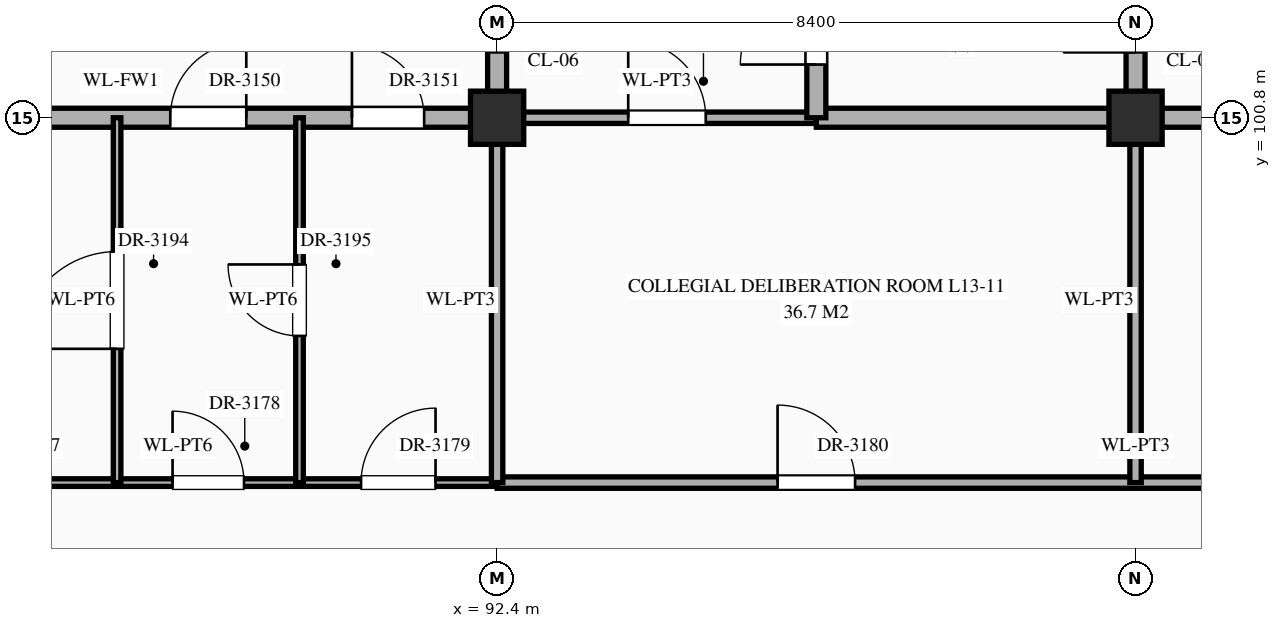
"""IFC4 building model, lengths in metres.
Left out: names, types, materials, properties, quantities, classifications, styles, units other than length and angle.
Written with IfcOpenShell. Run it as: python <this file> out.ifc"""

import sys

from ifc_helpers import new_model, si_unit, direction, frame, frame_2d, origin, origin_2d, place, context, subcontext, project, spatial, rectangle, extrude, element, fill, save


model = new_model("IFC4")
c1 = context("Model", 3, precision=1e-05, world=origin(), true_north=direction((0.0, 1.0)))
c2 = subcontext(c1, "Body", "Model", "MODEL_VIEW")
j1 = project(units=[si_unit("LENGTHUNIT", "METRE"), si_unit("PLANEANGLEUNIT", "RADIAN")], contexts=[c1])
p1 = place(None, origin())
s1 = spatial("IfcSite", under=j1, at=p1, CompositionType="ELEMENT")
p2 = place(p1, origin())
s2 = spatial("IfcBuilding", under=s1, at=p2, CompositionType="ELEMENT")
p3 = place(p2, frame((0.0, 0.0, 56.1)))
s3 = spatial("IfcBuildingStorey", under=s2, at=p3, CompositionType="ELEMENT", Elevation=56.1)
for number, where, z_axis, x_axis in (
    (1, (92.4, 100.8, 0.0), (0.0, 0.0, 1.0), (1.0, 0.0, 0.0)),
    (2, (100.8, 100.8, 0.0), (0.0, 0.0, 1.0), (1.0, 0.0, 0.0)),
):
    element("IfcColumn", number, at=place(p3, frame(where, z_axis=z_axis, x_axis=x_axis)), inside=s3, PredefinedType="COLUMN", context=c2, shape_type="SweptSolid", body=[
        extrude(rectangle(XDim=0.7, YDim=0.7, at=origin_2d()), origin(), (0.0, 0.0, 1.0), 4.2),
    ])
p4 = place(p3, frame((84.0, 96.0, 0.0), z_axis=(0.0, 0.0, 1.0), x_axis=(1.0, 0.0, 0.0)))
e3 = element("IfcWall", 3, at=p4, inside=s3, PredefinedType="STANDARD", context=c2, shape_type="SweptSolid", body=[
    extrude(rectangle(XDim=8.4, YDim=0.1, at=frame_2d((4.2, 0.0))), origin(), (0.0, 0.0, 1.0), 3.96),
])
p5 = place(p4, frame((1.06, 0.0, 0.0)))
e4 = element("IfcOpeningElement", 4, at=p5, cuts=e3, PredefinedType="OPENING", context=c2, shape_type="SweptSolid", body=[
    extrude(rectangle(XDim=1.28, YDim=2.35, at=frame_2d((0.64, 1.175))), frame((0.0, 0.062, 0.0), z_axis=(0.0, -1.0, 0.0), x_axis=(1.0, 0.0, 0.0)), (0.0, 0.0, 1.0), 0.124),
])
p6 = place(p4, frame((4.13, 0.0, 0.0)))
e5 = element("IfcOpeningElement", 5, at=p6, cuts=e3, PredefinedType="OPENING", context=c2, shape_type="SweptSolid", body=[
    extrude(rectangle(XDim=0.94, YDim=2.3, at=frame_2d((0.47, 1.15))), frame((0.0, 0.062, 0.0), z_axis=(0.0, -1.0, 0.0), x_axis=(1.0, 0.0, 0.0)), (0.0, 0.0, 1.0), 0.124),
])
p7 = place(p4, frame((6.61, 0.0, 0.0)))
e6 = element("IfcOpeningElement", 6, at=p7, cuts=e3, PredefinedType="OPENING", context=c2, shape_type="SweptSolid", body=[
    extrude(rectangle(XDim=0.98, YDim=2.35, at=frame_2d((0.49, 1.175))), frame((0.0, 0.062, 0.0), z_axis=(0.0, -1.0, 0.0), x_axis=(1.0, 0.0, 0.0)), (0.0, 0.0, 1.0), 0.124),
])
p8 = place(p3, frame((92.4, 96.0, 0.0), z_axis=(0.0, 0.0, 1.0), x_axis=(1.0, 0.0, 0.0)))
e7 = element("IfcWall", 7, at=p8, inside=s3, PredefinedType="STANDARD", context=c2, shape_type="SweptSolid", body=[
    extrude(rectangle(XDim=16.8, YDim=0.15, at=frame_2d((8.4, 0.0))), origin(), (0.0, 0.0, 1.0), 3.96),
])
p9 = place(p8, frame((3.69, 0.0, 0.0)))
e8 = element("IfcOpeningElement", 8, at=p9, cuts=e7, PredefinedType="OPENING", context=c2, shape_type="SweptSolid", body=[
    extrude(rectangle(XDim=1.02, YDim=2.4, at=frame_2d((0.51, 1.2))), frame((0.0, 0.087, 0.0), z_axis=(0.0, -1.0, 0.0), x_axis=(1.0, 0.0, 0.0)), (0.0, 0.0, 1.0), 0.174),
])
p10 = place(p8, frame((12.07, 0.0, 0.0)))
e9 = element("IfcOpeningElement", 9, at=p10, cuts=e7, PredefinedType="OPENING", context=c2, shape_type="SweptSolid", body=[
    extrude(rectangle(XDim=1.06, YDim=2.4, at=frame_2d((0.53, 1.2))), frame((0.0, 0.087, 0.0), z_axis=(0.0, -1.0, 0.0), x_axis=(1.0, 0.0, 0.0)), (0.0, 0.0, 1.0), 0.174),
])
p11 = place(p3, frame((75.6, 100.8, 0.0), z_axis=(0.0, 0.0, 1.0), x_axis=(1.0, 0.0, 0.0)))
e10 = element("IfcWall", 10, at=p11, inside=s3, PredefinedType="STANDARD", context=c2, shape_type="SweptSolid", body=[
    extrude(rectangle(XDim=16.8, YDim=0.25, at=frame_2d((8.4, 0.0))), origin(), (0.0, 0.0, 1.0), 3.11),
])
p12 = place(p11, frame((3.725, 0.0, 0.0)))
e11 = element("IfcOpeningElement", 11, at=p12, cuts=e10, PredefinedType="OPENING", context=c2, shape_type="SweptSolid", body=[
    extrude(rectangle(XDim=0.95, YDim=2.15, at=frame_2d((0.475, 1.075))), frame((0.0, 0.137, 0.0), z_axis=(0.0, -1.0, 0.0), x_axis=(1.0, 0.0, 0.0)), (0.0, 0.0, 1.0), 0.274),
])
p13 = place(p11, frame((9.685, 0.0, 0.0)))
e12 = element("IfcOpeningElement", 12, at=p13, cuts=e10, PredefinedType="OPENING", context=c2, shape_type="SweptSolid", body=[
    extrude(rectangle(XDim=1.1, YDim=2.2, at=frame_2d((0.55, 1.1))), frame((0.0, 0.137, 0.0), z_axis=(0.0, -1.0, 0.0), x_axis=(1.0, 0.0, 0.0)), (0.0, 0.0, 1.0), 0.274),
])
p14 = place(p11, frame((12.5, 0.0, 0.0)))
e13 = element("IfcOpeningElement", 13, at=p14, cuts=e10, PredefinedType="OPENING", context=c2, shape_type="SweptSolid", body=[
    extrude(rectangle(XDim=1.0, YDim=2.2, at=frame_2d((0.5, 1.1))), frame((0.0, 0.137, 0.0), z_axis=(0.0, -1.0, 0.0), x_axis=(1.0, 0.0, 0.0)), (0.0, 0.0, 1.0), 0.274),
])
p15 = place(p11, frame((14.89, 0.0, 0.0)))
e14 = element("IfcOpeningElement", 14, at=p15, cuts=e10, PredefinedType="OPENING", context=c2, shape_type="SweptSolid", body=[
    extrude(rectangle(XDim=0.95, YDim=2.15, at=frame_2d((0.475, 1.075))), frame((0.0, 0.137, 0.0), z_axis=(0.0, -1.0, 0.0), x_axis=(1.0, 0.0, 0.0)), (0.0, 0.0, 1.0), 0.274),
])
p16 = place(p3, frame((92.4, 100.8, 0.0), z_axis=(0.0, 0.0, 1.0), x_axis=(1.0, 0.0, 0.0)))
e15 = element("IfcWall", 15, at=p16, inside=s3, PredefinedType="STANDARD", context=c2, shape_type="SweptSolid", body=[
    extrude(rectangle(XDim=4.2, YDim=0.15, at=frame_2d((2.1, 0.0))), origin(), (0.0, 0.0, 1.0), 3.11),
])
p17 = place(p16, frame((1.725, 0.0, 0.0)))
e16 = element("IfcOpeningElement", 16, at=p17, cuts=e15, PredefinedType="OPENING", context=c2, shape_type="SweptSolid", body=[
    extrude(rectangle(XDim=1.02, YDim=2.4, at=frame_2d((0.51, 1.2))), frame((0.0, 0.087, 0.0), z_axis=(0.0, -1.0, 0.0), x_axis=(1.0, 0.0, 0.0)), (0.0, 0.0, 1.0), 0.174),
])
p18 = place(p3, frame((96.6, 100.8, 0.0), z_axis=(0.0, 0.0, 1.0), x_axis=(1.0, 0.0, 0.0)))
e17 = element("IfcWall", 17, at=p18, inside=s3, PredefinedType="STANDARD", context=c2, shape_type="SweptSolid", body=[
    extrude(rectangle(XDim=12.6, YDim=0.25, at=frame_2d((6.3, 0.0))), origin(), (0.0, 0.0, 1.0), 3.11),
])
p19 = place(p18, frame((7.9, 0.0, 0.0)))
e18 = element("IfcOpeningElement", 18, at=p19, cuts=e17, PredefinedType="OPENING", context=c2, shape_type="SweptSolid", body=[
    extrude(rectangle(XDim=1.0, YDim=2.2, at=frame_2d((0.5, 1.1))), frame((0.0, 0.137, 0.0), z_axis=(0.0, -1.0, 0.0), x_axis=(1.0, 0.0, 0.0)), (0.0, 0.0, 1.0), 0.274),
])
p20 = place(p3, frame((87.4, 96.0, 0.0), z_axis=(0.0, 0.0, 1.0), x_axis=(0.0, 1.0, 0.0)))
e19 = element("IfcWall", 19, at=p20, inside=s3, PredefinedType="STANDARD", context=c2, shape_type="SweptSolid", body=[
    extrude(rectangle(XDim=4.8, YDim=0.1, at=frame_2d((2.4, 0.0))), origin(), (0.0, 0.0, 1.0), 3.96),
])
p21 = place(p20, frame((1.76, 0.0, 0.0)))
e20 = element("IfcOpeningElement", 20, at=p21, cuts=e19, PredefinedType="OPENING", context=c2, shape_type="SweptSolid", body=[
    extrude(rectangle(XDim=1.28, YDim=2.35, at=frame_2d((0.64, 1.175))), frame((0.0, 0.062, 0.0), z_axis=(0.0, -1.0, 0.0), x_axis=(1.0, 0.0, 0.0)), (0.0, 0.0, 1.0), 0.124),
])
p22 = place(p3, frame((89.8, 96.0, 0.0), z_axis=(0.0, 0.0, 1.0), x_axis=(0.0, 1.0, 0.0)))
e21 = element("IfcWall", 21, at=p22, inside=s3, PredefinedType="STANDARD", context=c2, shape_type="SweptSolid", body=[
    extrude(rectangle(XDim=4.8, YDim=0.1, at=frame_2d((2.4, 0.0))), origin(), (0.0, 0.0, 1.0), 3.96),
])
p23 = place(p22, frame((1.93, 0.0, 0.0)))
e22 = element("IfcOpeningElement", 22, at=p23, cuts=e21, PredefinedType="OPENING", context=c2, shape_type="SweptSolid", body=[
    extrude(rectangle(XDim=0.94, YDim=2.3, at=frame_2d((0.47, 1.15))), frame((0.0, 0.062, 0.0), z_axis=(0.0, -1.0, 0.0), x_axis=(1.0, 0.0, 0.0)), (0.0, 0.0, 1.0), 0.124),
])
p24 = place(p3, frame((92.4, 96.0, 0.0), z_axis=(0.0, 0.0, 1.0), x_axis=(0.0, 1.0, 0.0)))
e23 = element("IfcWall", 23, at=p24, inside=s3, PredefinedType="STANDARD", context=c2, shape_type="SweptSolid", body=[
    extrude(rectangle(XDim=4.8, YDim=0.15, at=frame_2d((2.4, 0.0))), origin(), (0.0, 0.0, 1.0), 3.21),
])
p25 = place(p3, frame((92.4, 100.8, 0.0), z_axis=(0.0, 0.0, 1.0), x_axis=(0.0, 1.0, 0.0)))
e24 = element("IfcWall", 24, at=p25, inside=s3, PredefinedType="STANDARD", context=c2, shape_type="SweptSolid", body=[
    extrude(rectangle(XDim=3.6, YDim=0.25, at=frame_2d((1.8, 0.0))), origin(), (0.0, 0.0, 1.0), 3.21),
])
p26 = place(p25, frame((0.86, 0.0, 0.0)))
e25 = element("IfcOpeningElement", 25, at=p26, cuts=e24, PredefinedType="OPENING", context=c2, shape_type="SweptSolid", body=[
    extrude(rectangle(XDim=0.95, YDim=2.15, at=frame_2d((0.475, 1.075))), frame((0.0, 0.137, 0.0), z_axis=(0.0, -1.0, 0.0), x_axis=(1.0, 0.0, 0.0)), (0.0, 0.0, 1.0), 0.274),
])
p27 = place(p3, frame((96.6, 100.8, 0.0), z_axis=(0.0, 0.0, 1.0), x_axis=(0.0, 1.0, 0.0)))
e26 = element("IfcWall", 26, at=p27, inside=s3, PredefinedType="STANDARD", context=c2, shape_type="SweptSolid", body=[
    extrude(rectangle(XDim=3.6, YDim=0.25, at=frame_2d((1.8, 0.0))), origin(), (0.0, 0.0, 1.0), 3.96),
])
p28 = place(p27, frame((0.7, 0.0, 0.0)))
e27 = element("IfcOpeningElement", 27, at=p28, cuts=e26, PredefinedType="OPENING", context=c2, shape_type="SweptSolid", body=[
    extrude(rectangle(XDim=1.0, YDim=2.2, at=frame_2d((0.5, 1.1))), frame((0.0, 0.137, 0.0), z_axis=(0.0, -1.0, 0.0), x_axis=(1.0, 0.0, 0.0)), (0.0, 0.0, 1.0), 0.274),
])
p29 = place(p3, frame((100.8, 96.0, 0.0), z_axis=(0.0, 0.0, 1.0), x_axis=(0.0, 1.0, 0.0)))
e28 = element("IfcWall", 28, at=p29, inside=s3, PredefinedType="STANDARD", context=c2, shape_type="SweptSolid", body=[
    extrude(rectangle(XDim=4.8, YDim=0.15, at=frame_2d((2.4, 0.0))), origin(), (0.0, 0.0, 1.0), 3.21),
])
p30 = place(p3, frame((100.8, 100.8, 0.0), z_axis=(0.0, 0.0, 1.0), x_axis=(0.0, 1.0, 0.0)))
e29 = element("IfcWall", 29, at=p30, inside=s3, PredefinedType="STANDARD", context=c2, shape_type="SweptSolid", body=[
    extrude(rectangle(XDim=2.4, YDim=0.25, at=frame_2d((1.2, 0.0))), origin(), (0.0, 0.0, 1.0), 3.21),
])
p31 = place(p30, frame((0.86, 0.0, 0.0)))
e30 = element("IfcOpeningElement", 30, at=p31, cuts=e29, PredefinedType="OPENING", context=c2, shape_type="SweptSolid", body=[
    extrude(rectangle(XDim=0.95, YDim=2.15, at=frame_2d((0.475, 1.075))), frame((0.0, 0.137, 0.0), z_axis=(0.0, -1.0, 0.0), x_axis=(1.0, 0.0, 0.0)), (0.0, 0.0, 1.0), 0.274),
])
p32 = place(p28, origin())
e31 = element("IfcDoor", 31, at=p32, inside=s3, OperationType="SINGLE_SWING_LEFT", PredefinedType="DOOR", context=c2, shape_type="SweptSolid", body=[
    extrude(rectangle(XDim=1.0, YDim=2.2, at=frame_2d((0.5, 1.1))), frame((0.0, 0.025, 0.0), z_axis=(0.0, -1.0, 0.0), x_axis=(1.0, 0.0, 0.0)), (0.0, 0.0, 1.0), 0.05),
])
fill(e27, e31)
p33 = place(p17, origin())
e32 = element("IfcDoor", 32, at=p33, inside=s3, OperationType="SINGLE_SWING_LEFT", PredefinedType="DOOR", context=c2, shape_type="SweptSolid", body=[
    extrude(rectangle(XDim=1.02, YDim=2.4, at=frame_2d((0.51, 1.2))), frame((0.0, 0.025, 0.0), z_axis=(0.0, -1.0, 0.0), x_axis=(1.0, 0.0, 0.0)), (0.0, 0.0, 1.0), 0.05),
])
fill(e16, e32)
p34 = place(p14, origin())
e33 = element("IfcDoor", 33, at=p34, inside=s3, OperationType="SINGLE_SWING_RIGHT", PredefinedType="DOOR", context=c2, shape_type="SweptSolid", body=[
    extrude(rectangle(XDim=1.0, YDim=2.2, at=frame_2d((0.5, 1.1))), frame((0.0, 0.025, 0.0), z_axis=(0.0, -1.0, 0.0), x_axis=(1.0, 0.0, 0.0)), (0.0, 0.0, 1.0), 0.05),
])
fill(e13, e33)
p35 = place(p15, origin())
e34 = element("IfcDoor", 34, at=p35, inside=s3, OperationType="SINGLE_SWING_LEFT", PredefinedType="DOOR", context=c2, shape_type="SweptSolid", body=[
    extrude(rectangle(XDim=0.95, YDim=2.15, at=frame_2d((0.475, 1.075))), frame((0.0, 0.025, 0.0), z_axis=(0.0, -1.0, 0.0), x_axis=(1.0, 0.0, 0.0)), (0.0, 0.0, 1.0), 0.05),
])
fill(e14, e34)
p36 = place(p6, origin())
e35 = element("IfcDoor", 35, at=p36, inside=s3, OperationType="SINGLE_SWING_LEFT", PredefinedType="DOOR", context=c2, shape_type="SweptSolid", body=[
    extrude(rectangle(XDim=0.94, YDim=2.3, at=frame_2d((0.47, 1.15))), frame((0.0, 0.025, 0.0), z_axis=(0.0, -1.0, 0.0), x_axis=(1.0, 0.0, 0.0)), (0.0, 0.0, 1.0), 0.05),
])
fill(e5, e35)
p37 = place(p7, origin())
e36 = element("IfcDoor", 36, at=p37, inside=s3, OperationType="SINGLE_SWING_RIGHT", PredefinedType="DOOR", context=c2, shape_type="SweptSolid", body=[
    extrude(rectangle(XDim=0.98, YDim=2.35, at=frame_2d((0.49, 1.175))), frame((0.0, 0.025, 0.0), z_axis=(0.0, -1.0, 0.0), x_axis=(1.0, 0.0, 0.0)), (0.0, 0.0, 1.0), 0.05),
])
fill(e6, e36)
p38 = place(p9, origin())
e37 = element("IfcDoor", 37, at=p38, inside=s3, OperationType="SINGLE_SWING_LEFT", PredefinedType="DOOR", context=c2, shape_type="SweptSolid", body=[
    extrude(rectangle(XDim=1.02, YDim=2.4, at=frame_2d((0.51, 1.2))), frame((0.0, 0.025, 0.0), z_axis=(0.0, -1.0, 0.0), x_axis=(1.0, 0.0, 0.0)), (0.0, 0.0, 1.0), 0.05),
])
fill(e8, e37)
p39 = place(p21, origin())
e38 = element("IfcDoor", 38, at=p39, inside=s3, OperationType="SINGLE_SWING_LEFT", PredefinedType="DOOR", context=c2, shape_type="SweptSolid", body=[
    extrude(rectangle(XDim=1.28, YDim=2.35, at=frame_2d((0.64, 1.175))), frame((0.0, 0.025, 0.0), z_axis=(0.0, -1.0, 0.0), x_axis=(1.0, 0.0, 0.0)), (0.0, 0.0, 1.0), 0.05),
])
fill(e20, e38)
p40 = place(p23, origin())
e39 = element("IfcDoor", 39, at=p40, inside=s3, OperationType="SINGLE_SWING_RIGHT", PredefinedType="DOOR", context=c2, shape_type="SweptSolid", body=[
    extrude(rectangle(XDim=0.94, YDim=2.3, at=frame_2d((0.47, 1.15))), frame((0.0, 0.025, 0.0), z_axis=(0.0, -1.0, 0.0), x_axis=(1.0, 0.0, 0.0)), (0.0, 0.0, 1.0), 0.05),
])
fill(e22, e39)
save(model, sys.argv[1])
